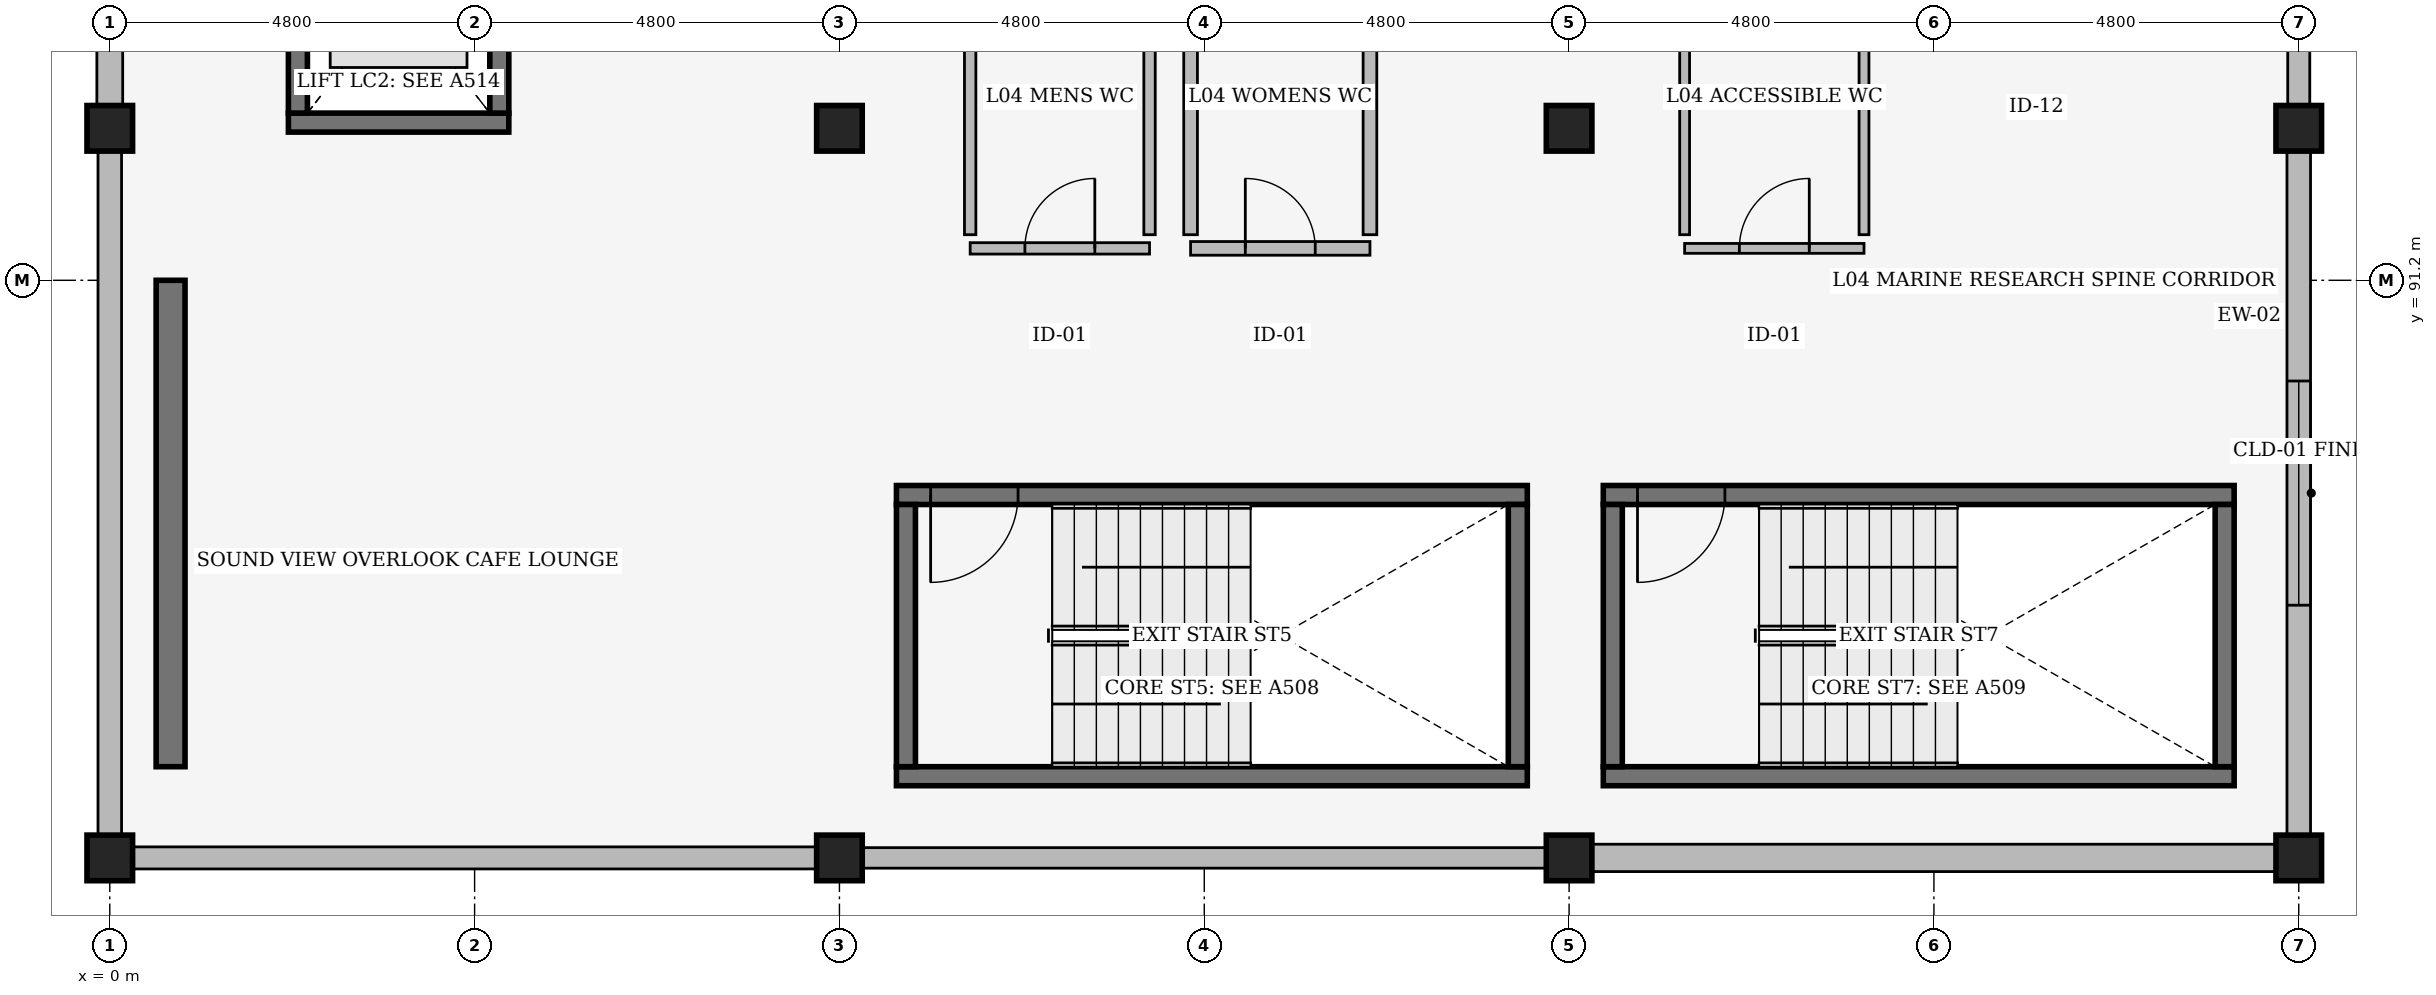
"""IFC4 building model, lengths in metres.
Left out: names, types, materials, properties, quantities, classifications, styles, units other than length and angle.
Written with IfcOpenShell. Run it as: python <this file> out.ifc"""

import sys

from ifc_helpers import new_model, si_unit, direction, frame, frame_2d, origin, origin_2d, place, context, subcontext, project, spatial, rectangle, extrude, element, fill, save


model = new_model("IFC4")
c1 = context("Model", 3, precision=1e-05, world=origin(), true_north=direction((0.0, 1.0)))
c2 = subcontext(c1, "Body", "Model", "MODEL_VIEW")
j1 = project(units=[si_unit("LENGTHUNIT", "METRE"), si_unit("PLANEANGLEUNIT", "RADIAN")], contexts=[c1])
p1 = place(None, origin())
s1 = spatial("IfcSite", under=j1, at=p1, CompositionType="ELEMENT")
p2 = place(p1, origin())
s2 = spatial("IfcBuilding", under=s1, at=p2, CompositionType="ELEMENT")
p3 = place(p2, frame((0.0, 0.0, 19.8)))
s3 = spatial("IfcBuildingStorey", under=s2, at=p3, CompositionType="ELEMENT", Elevation=19.8)
for number, where, z_axis, x_axis in (
    (1, (0.0, 83.6, 0.0), (0.0, 0.0, 1.0), (1.0, 0.0, 0.0)),
    (2, (0.0, 93.2, 0.0), (0.0, 0.0, 1.0), (1.0, 0.0, 0.0)),
    (3, (9.6, 83.6, 0.0), (0.0, 0.0, 1.0), (1.0, 0.0, 0.0)),
    (4, (9.6, 93.2, 0.0), (0.0, 0.0, 1.0), (1.0, 0.0, 0.0)),
    (5, (19.2, 83.6, 0.0), (0.0, 0.0, 1.0), (1.0, 0.0, 0.0)),
    (6, (19.2, 93.2, 0.0), (0.0, 0.0, 1.0), (1.0, 0.0, 0.0)),
    (7, (28.8, 83.6, 0.0), (0.0, 0.0, 1.0), (1.0, 0.0, 0.0)),
    (8, (28.8, 93.2, 0.0), (0.0, 0.0, 1.0), (1.0, 0.0, 0.0)),
):
    element("IfcColumn", number, at=place(p3, frame(where, z_axis=z_axis, x_axis=x_axis)), inside=s3, PredefinedType="COLUMN", context=c2, shape_type="SweptSolid", body=[
        extrude(rectangle(XDim=0.6, YDim=0.6, at=origin_2d()), origin(), (0.0, 0.0, 1.0), 3.6),
    ])
p4 = place(p3, frame((0.8, 84.8, 0.0), z_axis=(0.0, 0.0, 1.0), x_axis=(0.0, 1.0, 0.0)))
e9 = element("IfcWall", 9, at=p4, inside=s3, PredefinedType="SHEAR", context=c2, shape_type="SweptSolid", body=[
    extrude(rectangle(XDim=6.4, YDim=0.38, at=frame_2d((3.2, 0.0))), origin(), (0.0, 0.0, 1.0), 3.6),
])
p5 = place(p3, frame((28.8, 83.908, 0.0), z_axis=(0.0, 0.0, 1.0), x_axis=(0.0, 1.0, 0.0)))
e10 = element("IfcWall", 10, at=p5, inside=s3, PredefinedType="SOLIDWALL", context=c2, shape_type="SweptSolid", body=[
    extrude(rectangle(XDim=8.984, YDim=0.31, at=frame_2d((4.492, 0.0))), origin(), (0.0, 0.0, 1.0), 2.674),
])
p6 = place(p5, frame((3.017, 0.0, 0.95)))
e11 = element("IfcOpeningElement", 11, at=p6, cuts=e10, PredefinedType="OPENING", context=c2, shape_type="SweptSolid", body=[
    extrude(rectangle(XDim=2.95, YDim=1.2, at=frame_2d((1.475, 0.6))), frame((0.0, 0.165, 0.0), z_axis=(0.0, -1.0, 0.0), x_axis=(1.0, 0.0, 0.0)), (0.0, 0.0, 1.0), 0.33),
])
p7 = place(p3, frame((28.8, 93.508, 0.0), z_axis=(0.0, 0.0, 1.0), x_axis=(0.0, 1.0, 0.0)))
e12 = element("IfcWall", 12, at=p7, inside=s3, PredefinedType="SOLIDWALL", context=c2, shape_type="SweptSolid", body=[
    extrude(rectangle(XDim=8.984, YDim=0.29, at=frame_2d((4.492, 0.0))), origin(), (0.0, 0.0, 1.0), 2.674),
])
p8 = place(p7, frame((3.017, 0.0, 0.95)))
e13 = element("IfcOpeningElement", 13, at=p8, cuts=e12, PredefinedType="OPENING", context=c2, shape_type="SweptSolid", body=[
    extrude(rectangle(XDim=2.95, YDim=1.5, at=frame_2d((1.475, 0.75))), frame((0.0, 0.155, 0.0), z_axis=(0.0, -1.0, 0.0), x_axis=(1.0, 0.0, 0.0)), (0.0, 0.0, 1.0), 0.31),
])
p9 = place(p3, frame((0.0, 102.492, 0.0), z_axis=(0.0, 0.0, 1.0), x_axis=(0.0, -1.0, 0.0)))
e14 = element("IfcWall", 14, at=p9, inside=s3, PredefinedType="SOLIDWALL", context=c2, shape_type="SweptSolid", body=[
    extrude(rectangle(XDim=8.984, YDim=0.34, at=frame_2d((4.492, 0.0))), origin(), (0.0, 0.0, 1.0), 2.933),
])
p10 = place(p3, frame((0.0, 92.892, 0.0), z_axis=(0.0, 0.0, 1.0), x_axis=(0.0, -1.0, 0.0)))
e15 = element("IfcWall", 15, at=p10, inside=s3, PredefinedType="SOLIDWALL", context=c2, shape_type="SweptSolid", body=[
    extrude(rectangle(XDim=8.984, YDim=0.31, at=frame_2d((4.492, 0.0))), origin(), (0.0, 0.0, 1.0), 2.869),
])
p11 = place(p3, frame((0.308, 83.6, 0.0), z_axis=(0.0, 0.0, 1.0), x_axis=(1.0, 0.0, 0.0)))
e16 = element("IfcWall", 16, at=p11, inside=s3, PredefinedType="SOLIDWALL", context=c2, shape_type="SweptSolid", body=[
    extrude(rectangle(XDim=8.984, YDim=0.29, at=frame_2d((4.492, 0.0))), origin(), (0.0, 0.0, 1.0), 2.675),
])
p12 = place(p3, frame((9.908, 83.6, 0.0), z_axis=(0.0, 0.0, 1.0), x_axis=(1.0, 0.0, 0.0)))
e17 = element("IfcWall", 17, at=p12, inside=s3, PredefinedType="SOLIDWALL", context=c2, shape_type="SweptSolid", body=[
    extrude(rectangle(XDim=8.984, YDim=0.27, at=frame_2d((4.492, 0.0))), origin(), (0.0, 0.0, 1.0), 2.675),
])
p13 = place(p3, frame((19.508, 83.6, 0.0), z_axis=(0.0, 0.0, 1.0), x_axis=(1.0, 0.0, 0.0)))
e18 = element("IfcWall", 18, at=p13, inside=s3, PredefinedType="SOLIDWALL", context=c2, shape_type="SweptSolid", body=[
    extrude(rectangle(XDim=8.984, YDim=0.36, at=frame_2d((4.492, 0.0))), origin(), (0.0, 0.0, 1.0), 2.978),
])
p14 = place(p3, frame((10.35, 84.675, 0.0), z_axis=(0.0, 0.0, 1.0), x_axis=(1.0, 0.0, 0.0)))
e19 = element("IfcWall", 19, at=p14, inside=s3, PredefinedType="SHEAR", context=c2, shape_type="SweptSolid", body=[
    extrude(rectangle(XDim=8.3, YDim=0.25, at=frame_2d((4.15, 0.0))), origin(), (0.0, 0.0, 1.0), 3.32),
])
p15 = place(p3, frame((18.65, 88.375, 0.0), z_axis=(0.0, 0.0, 1.0), x_axis=(-1.0, 0.0, 0.0)))
e20 = element("IfcWall", 20, at=p15, inside=s3, PredefinedType="SHEAR", context=c2, shape_type="SweptSolid", body=[
    extrude(rectangle(XDim=8.3, YDim=0.25, at=frame_2d((4.15, 0.0))), origin(), (0.0, 0.0, 1.0), 3.32),
])
p16 = place(p15, frame((7.85, 0.0, 0.0), z_axis=(0.0, 0.0, 1.0), x_axis=(-1.0, 0.0, 0.0)))
e21 = element("IfcOpeningElement", 21, at=p16, cuts=e20, PredefinedType="OPENING", context=c2, shape_type="SweptSolid", body=[
    extrude(rectangle(XDim=1.15, YDim=2.2, at=frame_2d((0.575, 1.1))), frame((0.0, 0.135, 0.0), z_axis=(0.0, -1.0, 0.0), x_axis=(1.0, 0.0, 0.0)), (0.0, 0.0, 1.0), 0.27),
])
for number, where, z_axis, x_axis in (
    (22, (10.475, 88.25, 0.0), (0.0, 0.0, 1.0), (0.0, -1.0, 0.0)),
    (23, (18.525, 84.8, 0.0), (0.0, 0.0, 1.0), (0.0, 1.0, 0.0)),
):
    element("IfcWall", number, at=place(p3, frame(where, z_axis=z_axis, x_axis=x_axis)), inside=s3, PredefinedType="SHEAR", context=c2, shape_type="SweptSolid", body=[
        extrude(rectangle(XDim=3.45, YDim=0.25, at=frame_2d((1.725, 0.0))), origin(), (0.0, 0.0, 1.0), 3.32),
    ])
p17 = place(p3, frame((19.65, 84.675, 0.0), z_axis=(0.0, 0.0, 1.0), x_axis=(1.0, 0.0, 0.0)))
e24 = element("IfcWall", 24, at=p17, inside=s3, PredefinedType="SHEAR", context=c2, shape_type="SweptSolid", body=[
    extrude(rectangle(XDim=8.3, YDim=0.25, at=frame_2d((4.15, 0.0))), origin(), (0.0, 0.0, 1.0), 3.32),
])
p18 = place(p3, frame((27.95, 88.375, 0.0), z_axis=(0.0, 0.0, 1.0), x_axis=(-1.0, 0.0, 0.0)))
e25 = element("IfcWall", 25, at=p18, inside=s3, PredefinedType="SHEAR", context=c2, shape_type="SweptSolid", body=[
    extrude(rectangle(XDim=8.3, YDim=0.25, at=frame_2d((4.15, 0.0))), origin(), (0.0, 0.0, 1.0), 3.32),
])
p19 = place(p18, frame((7.85, 0.0, 0.0), z_axis=(0.0, 0.0, 1.0), x_axis=(-1.0, 0.0, 0.0)))
e26 = element("IfcOpeningElement", 26, at=p19, cuts=e25, PredefinedType="OPENING", context=c2, shape_type="SweptSolid", body=[
    extrude(rectangle(XDim=1.15, YDim=2.2, at=frame_2d((0.575, 1.1))), frame((0.0, 0.135, 0.0), z_axis=(0.0, -1.0, 0.0), x_axis=(1.0, 0.0, 0.0)), (0.0, 0.0, 1.0), 0.27),
])
for number, where, z_axis, x_axis in (
    (27, (19.775, 88.25, 0.0), (0.0, 0.0, 1.0), (0.0, -1.0, 0.0)),
    (28, (27.825, 84.8, 0.0), (0.0, 0.0, 1.0), (0.0, 1.0, 0.0)),
):
    element("IfcWall", number, at=place(p3, frame(where, z_axis=z_axis, x_axis=x_axis)), inside=s3, PredefinedType="SHEAR", context=c2, shape_type="SweptSolid", body=[
        extrude(rectangle(XDim=3.45, YDim=0.25, at=frame_2d((1.725, 0.0))), origin(), (0.0, 0.0, 1.0), 3.32),
    ])
p20 = place(p3, frame((2.35, 93.275, 0.0), z_axis=(0.0, 0.0, 1.0), x_axis=(1.0, 0.0, 0.0)))
e29 = element("IfcWall", 29, at=p20, inside=s3, PredefinedType="SHEAR", context=c2, shape_type="SweptSolid", body=[
    extrude(rectangle(XDim=2.9, YDim=0.25, at=frame_2d((1.45, 0.0))), origin(), (0.0, 0.0, 1.0), 3.32),
])
for number, where, z_axis, x_axis in (
    (30, (2.475, 93.4, 0.0), (0.0, 0.0, 1.0), (0.0, 1.0, 0.0)),
    (31, (5.125, 93.4, 0.0), (0.0, 0.0, 1.0), (0.0, 1.0, 0.0)),
):
    element("IfcWall", number, at=place(p3, frame(where, z_axis=z_axis, x_axis=x_axis)), inside=s3, PredefinedType="SHEAR", context=c2, shape_type="SweptSolid", body=[
        extrude(rectangle(XDim=3.1, YDim=0.25, at=frame_2d((1.55, 0.0))), origin(), (0.0, 0.0, 1.0), 3.32),
    ])
p21 = place(p3, frame((11.32, 91.62, 0.0), z_axis=(0.0, 0.0, 1.0), x_axis=(1.0, 0.0, 0.0)))
e32 = element("IfcWall", 32, at=p21, inside=s3, PredefinedType="PARTITIONING", context=c2, shape_type="SweptSolid", body=[
    extrude(rectangle(XDim=2.36, YDim=0.15, at=frame_2d((1.18, 0.0))), origin(), (0.0, 0.0, 1.0), 3.24),
])
p22 = place(p21, frame((0.72, 0.0, 0.0)))
e33 = element("IfcOpeningElement", 33, at=p22, cuts=e32, PredefinedType="OPENING", context=c2, shape_type="SweptSolid", body=[
    extrude(rectangle(XDim=0.92, YDim=2.12, at=frame_2d((0.46, 1.06))), frame((0.0, 0.085, 0.0), z_axis=(0.0, -1.0, 0.0), x_axis=(1.0, 0.0, 0.0)), (0.0, 0.0, 1.0), 0.17),
])
for number, where, z_axis, x_axis in (
    (34, (11.32, 91.8, 0.0), (0.0, 0.0, 1.0), (0.0, 1.0, 0.0)),
    (35, (13.68, 91.8, 0.0), (0.0, 0.0, 1.0), (0.0, 1.0, 0.0)),
):
    element("IfcWall", number, at=place(p3, frame(where, z_axis=z_axis, x_axis=x_axis)), inside=s3, PredefinedType="PARTITIONING", context=c2, shape_type="SweptSolid", body=[
        extrude(rectangle(XDim=2.52, YDim=0.15, at=frame_2d((1.26, 0.0))), origin(), (0.0, 0.0, 1.0), 2.923),
    ])
p23 = place(p3, frame((14.22, 91.62, 0.0), z_axis=(0.0, 0.0, 1.0), x_axis=(1.0, 0.0, 0.0)))
e36 = element("IfcWall", 36, at=p23, inside=s3, PredefinedType="PARTITIONING", context=c2, shape_type="SweptSolid", body=[
    extrude(rectangle(XDim=2.36, YDim=0.18, at=frame_2d((1.18, 0.0))), origin(), (0.0, 0.0, 1.0), 3.24),
])
p24 = place(p23, frame((0.72, 0.0, 0.0)))
e37 = element("IfcOpeningElement", 37, at=p24, cuts=e36, PredefinedType="OPENING", context=c2, shape_type="SweptSolid", body=[
    extrude(rectangle(XDim=0.92, YDim=2.12, at=frame_2d((0.46, 1.06))), frame((0.0, 0.1, 0.0), z_axis=(0.0, -1.0, 0.0), x_axis=(1.0, 0.0, 0.0)), (0.0, 0.0, 1.0), 0.2),
])
for number, where, z_axis, x_axis in (
    (38, (14.22, 91.8, 0.0), (0.0, 0.0, 1.0), (0.0, 1.0, 0.0)),
    (39, (16.58, 91.8, 0.0), (0.0, 0.0, 1.0), (0.0, 1.0, 0.0)),
):
    element("IfcWall", number, at=place(p3, frame(where, z_axis=z_axis, x_axis=x_axis)), inside=s3, PredefinedType="PARTITIONING", context=c2, shape_type="SweptSolid", body=[
        extrude(rectangle(XDim=2.52, YDim=0.18, at=frame_2d((1.26, 0.0))), origin(), (0.0, 0.0, 1.0), 2.923),
    ])
p25 = place(p3, frame((20.72, 91.62, 0.0), z_axis=(0.0, 0.0, 1.0), x_axis=(1.0, 0.0, 0.0)))
e40 = element("IfcWall", 40, at=p25, inside=s3, PredefinedType="PARTITIONING", context=c2, shape_type="SweptSolid", body=[
    extrude(rectangle(XDim=2.36, YDim=0.13, at=frame_2d((1.18, 0.0))), origin(), (0.0, 0.0, 1.0), 3.24),
])
p26 = place(p25, frame((0.72, 0.0, 0.0)))
e41 = element("IfcOpeningElement", 41, at=p26, cuts=e40, PredefinedType="OPENING", context=c2, shape_type="SweptSolid", body=[
    extrude(rectangle(XDim=0.92, YDim=2.12, at=frame_2d((0.46, 1.06))), frame((0.0, 0.075, 0.0), z_axis=(0.0, -1.0, 0.0), x_axis=(1.0, 0.0, 0.0)), (0.0, 0.0, 1.0), 0.15),
])
for number, where, z_axis, x_axis in (
    (42, (20.72, 91.8, 0.0), (0.0, 0.0, 1.0), (0.0, 1.0, 0.0)),
    (43, (23.08, 91.8, 0.0), (0.0, 0.0, 1.0), (0.0, 1.0, 0.0)),
):
    element("IfcWall", number, at=place(p3, frame(where, z_axis=z_axis, x_axis=x_axis)), inside=s3, PredefinedType="PARTITIONING", context=c2, shape_type="SweptSolid", body=[
        extrude(rectangle(XDim=2.52, YDim=0.13, at=frame_2d((1.26, 0.0))), origin(), (0.0, 0.0, 1.0), 2.674),
    ])
p27 = place(p6, origin())
e44 = element("IfcWindow", 44, at=p27, inside=s3, PartitioningType="SINGLE_PANEL", PredefinedType="WINDOW", context=c2, shape_type="SweptSolid", body=[
    extrude(rectangle(XDim=2.95, YDim=1.2, at=frame_2d((1.475, 0.6))), frame((0.0, 0.03, 0.0), z_axis=(0.0, -1.0, 0.0), x_axis=(1.0, 0.0, 0.0)), (0.0, 0.0, 1.0), 0.06),
])
fill(e11, e44)
p28 = place(p16, origin())
e45 = element("IfcDoor", 45, at=p28, inside=s3, OperationType="SINGLE_SWING_LEFT", PredefinedType="DOOR", context=c2, shape_type="SweptSolid", body=[
    extrude(rectangle(XDim=1.15, YDim=2.2, at=frame_2d((0.575, 1.1))), frame((0.0, 0.025, 0.0), z_axis=(0.0, -1.0, 0.0), x_axis=(1.0, 0.0, 0.0)), (0.0, 0.0, 1.0), 0.05),
])
fill(e21, e45)
p29 = place(p19, origin())
e46 = element("IfcDoor", 46, at=p29, inside=s3, OperationType="SINGLE_SWING_LEFT", PredefinedType="DOOR", context=c2, shape_type="SweptSolid", body=[
    extrude(rectangle(XDim=1.15, YDim=2.2, at=frame_2d((0.575, 1.1))), frame((0.0, 0.025, 0.0), z_axis=(0.0, -1.0, 0.0), x_axis=(1.0, 0.0, 0.0)), (0.0, 0.0, 1.0), 0.05),
])
fill(e26, e46)
p30 = place(p22, origin())
e47 = element("IfcDoor", 47, at=p30, inside=s3, OperationType="SINGLE_SWING_RIGHT", PredefinedType="DOOR", context=c2, shape_type="SweptSolid", body=[
    extrude(rectangle(XDim=0.92, YDim=2.12, at=frame_2d((0.46, 1.06))), frame((0.0, 0.025, 0.0), z_axis=(0.0, -1.0, 0.0), x_axis=(1.0, 0.0, 0.0)), (0.0, 0.0, 1.0), 0.05),
])
fill(e33, e47)
p31 = place(p24, origin())
e48 = element("IfcDoor", 48, at=p31, inside=s3, OperationType="SINGLE_SWING_LEFT", PredefinedType="DOOR", context=c2, shape_type="SweptSolid", body=[
    extrude(rectangle(XDim=0.92, YDim=2.12, at=frame_2d((0.46, 1.06))), frame((0.0, 0.025, 0.0), z_axis=(0.0, -1.0, 0.0), x_axis=(1.0, 0.0, 0.0)), (0.0, 0.0, 1.0), 0.05),
])
fill(e37, e48)
p32 = place(p26, origin())
e49 = element("IfcDoor", 49, at=p32, inside=s3, OperationType="SINGLE_SWING_RIGHT", PredefinedType="DOOR", context=c2, shape_type="SweptSolid", body=[
    extrude(rectangle(XDim=0.92, YDim=2.12, at=frame_2d((0.46, 1.06))), frame((0.0, 0.025, 0.0), z_axis=(0.0, -1.0, 0.0), x_axis=(1.0, 0.0, 0.0)), (0.0, 0.0, 1.0), 0.05),
])
fill(e41, e49)
save(model, sys.argv[1])
